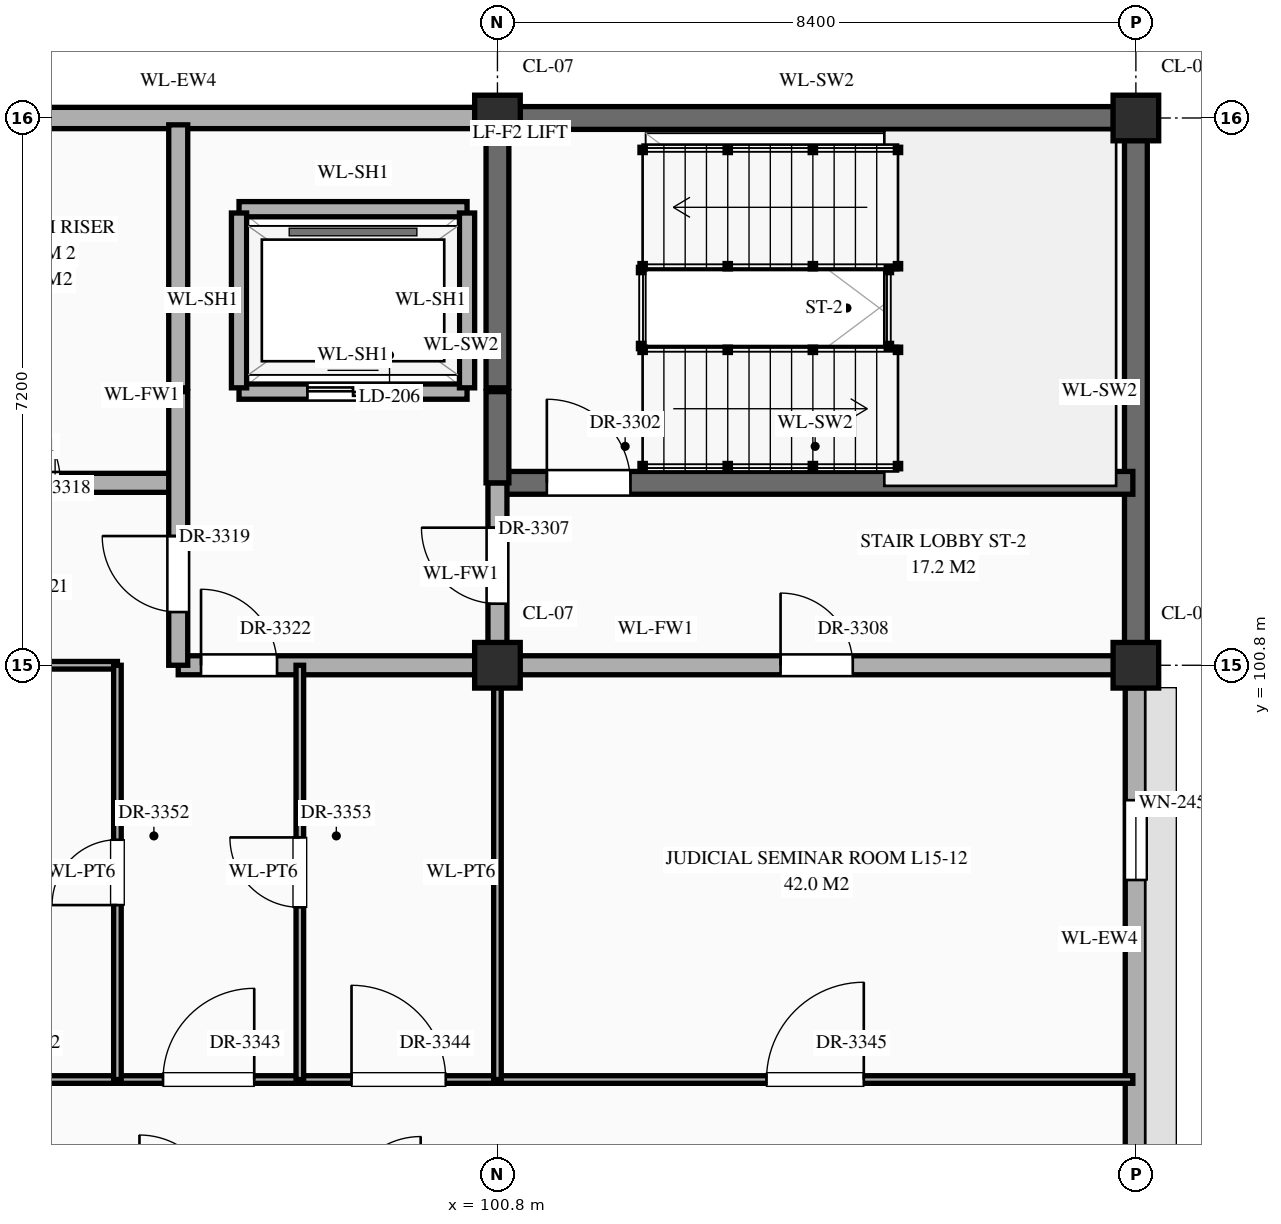
"""IFC4 building model, lengths in metres.
Left out: names, types, materials, properties, quantities, classifications, styles, units other than length and angle.
Written with IfcOpenShell. Run it as: python <this file> out.ifc"""

import sys

from ifc_helpers import new_model, si_unit, direction, frame, frame_2d, origin, origin_2d, place, context, subcontext, project, spatial, rectangle, extrude, element, fill, save


model = new_model("IFC4")
c1 = context("Model", 3, precision=1e-05, world=origin(), true_north=direction((0.0, 1.0)))
c2 = subcontext(c1, "Body", "Model", "MODEL_VIEW")
j1 = project(units=[si_unit("LENGTHUNIT", "METRE"), si_unit("PLANEANGLEUNIT", "RADIAN")], contexts=[c1])
p1 = place(None, origin())
s1 = spatial("IfcSite", under=j1, at=p1, CompositionType="ELEMENT")
p2 = place(p1, origin())
s2 = spatial("IfcBuilding", under=s1, at=p2, CompositionType="ELEMENT")
p3 = place(p2, frame((0.0, 0.0, 64.5)))
s3 = spatial("IfcBuildingStorey", under=s2, at=p3, CompositionType="ELEMENT", Elevation=64.5)
for number, where, z_axis, x_axis in (
    (1, (100.8, 100.8, 0.0), (0.0, 0.0, 1.0), (1.0, 0.0, 0.0)),
    (2, (100.8, 108.0, 0.0), (0.0, 0.0, 1.0), (1.0, 0.0, 0.0)),
    (3, (109.2, 100.8, 0.0), (0.0, 0.0, 1.0), (1.0, 0.0, 0.0)),
    (4, (109.2, 108.0, 0.0), (0.0, 0.0, 1.0), (1.0, 0.0, 0.0)),
):
    element("IfcColumn", number, at=place(p3, frame(where, z_axis=z_axis, x_axis=x_axis)), inside=s3, PredefinedType="COLUMN", context=c2, shape_type="SweptSolid", body=[
        extrude(rectangle(XDim=0.6, YDim=0.6, at=origin_2d()), origin(), (0.0, 0.0, 1.0), 4.2),
    ])
p4 = place(p3, frame((92.695, 108.0, 0.0), z_axis=(0.0, 0.0, 1.0), x_axis=(1.0, 0.0, 0.0)))
e5 = element("IfcWall", 5, at=p4, inside=s3, PredefinedType="STANDARD", context=c2, shape_type="SweptSolid", body=[
    extrude(rectangle(XDim=7.81, YDim=0.28, at=frame_2d((3.905, 0.0))), origin(), (0.0, 0.0, 1.0), 3.3),
])
p5 = place(p3, frame((109.2, 93.895, 0.0), z_axis=(0.0, 0.0, 1.0), x_axis=(0.0, 1.0, 0.0)))
e6 = element("IfcWall", 6, at=p5, inside=s3, PredefinedType="STANDARD", context=c2, shape_type="SweptSolid", body=[
    extrude(rectangle(XDim=6.61, YDim=0.28, at=frame_2d((3.305, 0.0))), origin(), (0.0, 0.0, 1.0), 3.3),
])
p6 = place(p5, frame((4.08, 0.0, 0.85)))
e7 = element("IfcOpeningElement", 7, at=p6, cuts=e6, PredefinedType="OPENING", context=c2, shape_type="SweptSolid", body=[
    extrude(rectangle(XDim=1.05, YDim=2.12, at=frame_2d((0.525, 1.06))), frame((0.0, 0.152, 0.0), z_axis=(0.0, -1.0, 0.0), x_axis=(1.0, 0.0, 0.0)), (0.0, 0.0, 1.0), 0.304),
])
p7 = place(p3, frame((101.095, 108.0, 0.0), z_axis=(0.0, 0.0, 1.0), x_axis=(1.0, 0.0, 0.0)))
e8 = element("IfcWall", 8, at=p7, inside=s3, PredefinedType="SHEAR", context=c2, shape_type="SweptSolid", body=[
    extrude(rectangle(XDim=7.81, YDim=0.3, at=frame_2d((3.905, 0.0))), origin(), (0.0, 0.0, 1.0), 3.95),
])
p8 = place(p3, frame((109.2, 101.095, 0.0), z_axis=(0.0, 0.0, 1.0), x_axis=(0.0, 1.0, 0.0)))
e9 = element("IfcWall", 9, at=p8, inside=s3, PredefinedType="SHEAR", context=c2, shape_type="SweptSolid", body=[
    extrude(rectangle(XDim=6.61, YDim=0.3, at=frame_2d((3.305, 0.0))), origin(), (0.0, 0.0, 1.0), 3.95),
])
p9 = place(p3, frame((58.84, 95.35, 0.0), z_axis=(0.0, 0.0, 1.0), x_axis=(1.0, 0.0, 0.0)))
e10 = element("IfcWall", 10, at=p9, inside=s3, PredefinedType="STANDARD", context=c2, shape_type="SweptSolid", body=[
    extrude(rectangle(XDim=50.32, YDim=0.1, at=frame_2d((25.16, 0.0))), origin(), (0.0, 0.0, 1.0), 3.95),
])
p10 = place(p9, frame((3.61, 0.0, 0.0)))
e11 = element("IfcOpeningElement", 11, at=p10, cuts=e10, PredefinedType="OPENING", context=c2, shape_type="SweptSolid", body=[
    extrude(rectangle(XDim=1.14, YDim=2.4, at=frame_2d((0.57, 1.2))), frame((0.0, 0.062, 0.0), z_axis=(0.0, -1.0, 0.0), x_axis=(1.0, 0.0, 0.0)), (0.0, 0.0, 1.0), 0.124),
])
p11 = place(p9, frame((9.61, 0.0, 0.0)))
e12 = element("IfcOpeningElement", 12, at=p11, cuts=e10, PredefinedType="OPENING", context=c2, shape_type="SweptSolid", body=[
    extrude(rectangle(XDim=0.9, YDim=2.15, at=frame_2d((0.45, 1.075))), frame((0.0, 0.062, 0.0), z_axis=(0.0, -1.0, 0.0), x_axis=(1.0, 0.0, 0.0)), (0.0, 0.0, 1.0), 0.124),
])
p12 = place(p9, frame((12.53, 0.0, 0.0)))
e13 = element("IfcOpeningElement", 13, at=p12, cuts=e10, PredefinedType="OPENING", context=c2, shape_type="SweptSolid", body=[
    extrude(rectangle(XDim=0.86, YDim=2.1, at=frame_2d((0.43, 1.05))), frame((0.0, 0.062, 0.0), z_axis=(0.0, -1.0, 0.0), x_axis=(1.0, 0.0, 0.0)), (0.0, 0.0, 1.0), 0.124),
])
p13 = place(p9, frame((15.0, 0.0, 0.0)))
e14 = element("IfcOpeningElement", 14, at=p13, cuts=e10, PredefinedType="OPENING", context=c2, shape_type="SweptSolid", body=[
    extrude(rectangle(XDim=0.92, YDim=2.15, at=frame_2d((0.46, 1.075))), frame((0.0, 0.062, 0.0), z_axis=(0.0, -1.0, 0.0), x_axis=(1.0, 0.0, 0.0)), (0.0, 0.0, 1.0), 0.124),
])
p14 = place(p9, frame((20.48, 0.0, 0.0)))
e15 = element("IfcOpeningElement", 15, at=p14, cuts=e10, PredefinedType="OPENING", context=c2, shape_type="SweptSolid", body=[
    extrude(rectangle(XDim=0.96, YDim=2.2, at=frame_2d((0.48, 1.1))), frame((0.0, 0.062, 0.0), z_axis=(0.0, -1.0, 0.0), x_axis=(1.0, 0.0, 0.0)), (0.0, 0.0, 1.0), 0.124),
])
p15 = place(p9, frame((28.8, 0.0, 0.0)))
e16 = element("IfcOpeningElement", 16, at=p15, cuts=e10, PredefinedType="OPENING", context=c2, shape_type="SweptSolid", body=[
    extrude(rectangle(XDim=1.12, YDim=2.25, at=frame_2d((0.56, 1.125))), frame((0.0, 0.062, 0.0), z_axis=(0.0, -1.0, 0.0), x_axis=(1.0, 0.0, 0.0)), (0.0, 0.0, 1.0), 0.124),
])
p16 = place(p9, frame((34.68, 0.0, 0.0)))
e17 = element("IfcOpeningElement", 17, at=p16, cuts=e10, PredefinedType="OPENING", context=c2, shape_type="SweptSolid", body=[
    extrude(rectangle(XDim=1.16, YDim=2.3, at=frame_2d((0.58, 1.15))), frame((0.0, 0.062, 0.0), z_axis=(0.0, -1.0, 0.0), x_axis=(1.0, 0.0, 0.0)), (0.0, 0.0, 1.0), 0.124),
])
p17 = place(p9, frame((37.56, 0.0, 0.0)))
e18 = element("IfcOpeningElement", 18, at=p17, cuts=e10, PredefinedType="OPENING", context=c2, shape_type="SweptSolid", body=[
    extrude(rectangle(XDim=1.2, YDim=2.35, at=frame_2d((0.6, 1.175))), frame((0.0, 0.062, 0.0), z_axis=(0.0, -1.0, 0.0), x_axis=(1.0, 0.0, 0.0)), (0.0, 0.0, 1.0), 0.124),
])
p18 = place(p9, frame((40.04, 0.0, 0.0)))
e19 = element("IfcOpeningElement", 19, at=p18, cuts=e10, PredefinedType="OPENING", context=c2, shape_type="SweptSolid", body=[
    extrude(rectangle(XDim=1.24, YDim=2.3, at=frame_2d((0.62, 1.15))), frame((0.0, 0.062, 0.0), z_axis=(0.0, -1.0, 0.0), x_axis=(1.0, 0.0, 0.0)), (0.0, 0.0, 1.0), 0.124),
])
p19 = place(p9, frame((45.5, 0.0, 0.0)))
e20 = element("IfcOpeningElement", 20, at=p19, cuts=e10, PredefinedType="OPENING", context=c2, shape_type="SweptSolid", body=[
    extrude(rectangle(XDim=1.28, YDim=2.35, at=frame_2d((0.64, 1.175))), frame((0.0, 0.062, 0.0), z_axis=(0.0, -1.0, 0.0), x_axis=(1.0, 0.0, 0.0)), (0.0, 0.0, 1.0), 0.124),
])
p20 = place(p3, frame((92.4, 100.8, 0.0), z_axis=(0.0, 0.0, 1.0), x_axis=(1.0, 0.0, 0.0)))
e21 = element("IfcWall", 21, at=p20, inside=s3, PredefinedType="STANDARD", context=c2, shape_type="SweptSolid", body=[
    extrude(rectangle(XDim=3.4, YDim=0.1, at=frame_2d((1.7, 0.0))), origin(), (0.0, 0.0, 1.0), 3.1),
])
p21 = place(p20, frame((1.31, 0.0, 0.0)))
e22 = element("IfcOpeningElement", 22, at=p21, cuts=e21, PredefinedType="OPENING", context=c2, shape_type="SweptSolid", body=[
    extrude(rectangle(XDim=1.0, YDim=2.25, at=frame_2d((0.5, 1.125))), frame((0.0, 0.062, 0.0), z_axis=(0.0, -1.0, 0.0), x_axis=(1.0, 0.0, 0.0)), (0.0, 0.0, 1.0), 0.124),
])
p22 = place(p3, frame((96.6, 100.8, 0.0), z_axis=(0.0, 0.0, 1.0), x_axis=(1.0, 0.0, 0.0)))
e23 = element("IfcWall", 23, at=p22, inside=s3, PredefinedType="STANDARD", context=c2, shape_type="SweptSolid", body=[
    extrude(rectangle(XDim=12.56, YDim=0.25, at=frame_2d((6.28, 0.0))), origin(), (0.0, 0.0, 1.0), 3.1),
])
p23 = place(p22, frame((7.925, 0.0, 0.0)))
e24 = element("IfcOpeningElement", 24, at=p23, cuts=e23, PredefinedType="OPENING", context=c2, shape_type="SweptSolid", body=[
    extrude(rectangle(XDim=0.95, YDim=2.15, at=frame_2d((0.475, 1.075))), frame((0.0, 0.137, 0.0), z_axis=(0.0, -1.0, 0.0), x_axis=(1.0, 0.0, 0.0)), (0.0, 0.0, 1.0), 0.274),
])
p24 = place(p22, frame((0.3, 0.0, 0.0)))
e25 = element("IfcOpeningElement", 25, at=p24, cuts=e23, PredefinedType="OPENING", context=c2, shape_type="SweptSolid", body=[
    extrude(rectangle(XDim=1.0, YDim=2.2, at=frame_2d((0.5, 1.1))), frame((0.0, 0.137, 0.0), z_axis=(0.0, -1.0, 0.0), x_axis=(1.0, 0.0, 0.0)), (0.0, 0.0, 1.0), 0.274),
])
p25 = place(p3, frame((92.4, 103.2, 0.0), z_axis=(0.0, 0.0, 1.0), x_axis=(1.0, 0.0, 0.0)))
e26 = element("IfcWall", 26, at=p25, inside=s3, PredefinedType="STANDARD", context=c2, shape_type="SweptSolid", body=[
    extrude(rectangle(XDim=4.2, YDim=0.25, at=frame_2d((2.1, 0.0))), origin(), (0.0, 0.0, 1.0), 3.95),
])
p26 = place(p25, frame((1.55, 0.0, 0.0)))
e27 = element("IfcOpeningElement", 27, at=p26, cuts=e26, PredefinedType="OPENING", context=c2, shape_type="SweptSolid", body=[
    extrude(rectangle(XDim=1.1, YDim=2.2, at=frame_2d((0.55, 1.1))), frame((0.0, 0.137, 0.0), z_axis=(0.0, -1.0, 0.0), x_axis=(1.0, 0.0, 0.0)), (0.0, 0.0, 1.0), 0.274),
])
p27 = place(p3, frame((100.8, 103.2, 0.0), z_axis=(0.0, 0.0, 1.0), x_axis=(1.0, 0.0, 0.0)))
e28 = element("IfcWall", 28, at=p27, inside=s3, PredefinedType="SHEAR", context=c2, shape_type="SweptSolid", body=[
    extrude(rectangle(XDim=8.36, YDim=0.3, at=frame_2d((4.18, 0.0))), origin(), (0.0, 0.0, 1.0), 3.95),
])
p28 = place(p27, frame((0.65, 0.0, 0.0)))
e29 = element("IfcOpeningElement", 29, at=p28, cuts=e28, PredefinedType="OPENING", context=c2, shape_type="SweptSolid", body=[
    extrude(rectangle(XDim=1.1, YDim=2.2, at=frame_2d((0.55, 1.1))), frame((0.0, 0.162, 0.0), z_axis=(0.0, -1.0, 0.0), x_axis=(1.0, 0.0, 0.0)), (0.0, 0.0, 1.0), 0.324),
])
p29 = place(p3, frame((97.4, 104.4, 0.0), z_axis=(0.0, 0.0, 1.0), x_axis=(1.0, 0.0, 0.0)))
e30 = element("IfcWall", 30, at=p29, inside=s3, PredefinedType="STANDARD", context=c2, shape_type="SweptSolid", body=[
    extrude(rectangle(XDim=3.0, YDim=0.2, at=frame_2d((1.5, 0.0))), origin(), (0.0, 0.0, 1.0), 3.95),
])
p30 = place(p29, frame((0.9, 0.0, 0.0)))
e31 = element("IfcOpeningElement", 31, at=p30, cuts=e30, PredefinedType="OPENING", context=c2, shape_type="SweptSolid", body=[
    extrude(rectangle(XDim=1.2, YDim=2.15, at=frame_2d((0.6, 1.075))), frame((0.0, 0.112, 0.0), z_axis=(0.0, -1.0, 0.0), x_axis=(1.0, 0.0, 0.0)), (0.0, 0.0, 1.0), 0.224),
])
p31 = place(p3, frame((97.4, 106.8, 0.0), z_axis=(0.0, 0.0, 1.0), x_axis=(1.0, 0.0, 0.0)))
e32 = element("IfcWall", 32, at=p31, inside=s3, PredefinedType="STANDARD", context=c2, shape_type="SweptSolid", body=[
    extrude(rectangle(XDim=3.0, YDim=0.2, at=frame_2d((1.5, 0.0))), origin(), (0.0, 0.0, 1.0), 3.95),
])
p32 = place(p3, frame((95.8, 95.35, 0.0), z_axis=(0.0, 0.0, 1.0), x_axis=(0.0, 1.0, 0.0)))
e33 = element("IfcWall", 33, at=p32, inside=s3, PredefinedType="STANDARD", context=c2, shape_type="SweptSolid", body=[
    extrude(rectangle(XDim=5.45, YDim=0.1, at=frame_2d((2.725, 0.0))), origin(), (0.0, 0.0, 1.0), 3.95),
])
p33 = place(p32, frame((2.295, 0.0, 0.0)))
e34 = element("IfcOpeningElement", 34, at=p33, cuts=e33, PredefinedType="OPENING", context=c2, shape_type="SweptSolid", body=[
    extrude(rectangle(XDim=0.86, YDim=2.1, at=frame_2d((0.43, 1.05))), frame((0.0, 0.062, 0.0), z_axis=(0.0, -1.0, 0.0), x_axis=(1.0, 0.0, 0.0)), (0.0, 0.0, 1.0), 0.124),
])
p34 = place(p3, frame((96.6, 100.8, 0.0), z_axis=(0.0, 0.0, 1.0), x_axis=(0.0, 1.0, 0.0)))
e35 = element("IfcWall", 35, at=p34, inside=s3, PredefinedType="STANDARD", context=c2, shape_type="SweptSolid", body=[
    extrude(rectangle(XDim=3.6, YDim=0.25, at=frame_2d((1.8, 0.0))), origin(), (0.0, 0.0, 1.0), 3.95),
])
p35 = place(p34, frame((0.7, 0.0, 0.0)))
e36 = element("IfcOpeningElement", 36, at=p35, cuts=e35, PredefinedType="OPENING", context=c2, shape_type="SweptSolid", body=[
    extrude(rectangle(XDim=1.0, YDim=2.2, at=frame_2d((0.5, 1.1))), frame((0.0, 0.137, 0.0), z_axis=(0.0, -1.0, 0.0), x_axis=(1.0, 0.0, 0.0)), (0.0, 0.0, 1.0), 0.274),
])
p36 = place(p3, frame((96.6, 104.45, 0.0), z_axis=(0.0, 0.0, 1.0), x_axis=(0.0, 1.0, 0.0)))
e37 = element("IfcWall", 37, at=p36, inside=s3, PredefinedType="STANDARD", context=c2, shape_type="SweptSolid", body=[
    extrude(rectangle(XDim=3.46, YDim=0.25, at=frame_2d((1.73, 0.0))), origin(), (0.0, 0.0, 1.0), 3.95),
])
p37 = place(p3, frame((97.4, 104.45, 0.0), z_axis=(0.0, 0.0, 1.0), x_axis=(0.0, 1.0, 0.0)))
e38 = element("IfcWall", 38, at=p37, inside=s3, PredefinedType="STANDARD", context=c2, shape_type="SweptSolid", body=[
    extrude(rectangle(XDim=2.3, YDim=0.2, at=frame_2d((1.15, 0.0))), origin(), (0.0, 0.0, 1.0), 3.95),
])
p38 = place(p3, frame((98.2, 95.35, 0.0), z_axis=(0.0, 0.0, 1.0), x_axis=(0.0, 1.0, 0.0)))
e39 = element("IfcWall", 39, at=p38, inside=s3, PredefinedType="STANDARD", context=c2, shape_type="SweptSolid", body=[
    extrude(rectangle(XDim=5.45, YDim=0.1, at=frame_2d((2.725, 0.0))), origin(), (0.0, 0.0, 1.0), 3.95),
])
p39 = place(p38, frame((2.265, 0.0, 0.0)))
e40 = element("IfcOpeningElement", 40, at=p39, cuts=e39, PredefinedType="OPENING", context=c2, shape_type="SweptSolid", body=[
    extrude(rectangle(XDim=0.92, YDim=2.15, at=frame_2d((0.46, 1.075))), frame((0.0, 0.062, 0.0), z_axis=(0.0, -1.0, 0.0), x_axis=(1.0, 0.0, 0.0)), (0.0, 0.0, 1.0), 0.124),
])
p40 = place(p3, frame((100.4, 104.45, 0.0), z_axis=(0.0, 0.0, 1.0), x_axis=(0.0, 1.0, 0.0)))
e41 = element("IfcWall", 41, at=p40, inside=s3, PredefinedType="STANDARD", context=c2, shape_type="SweptSolid", body=[
    extrude(rectangle(XDim=2.3, YDim=0.2, at=frame_2d((1.15, 0.0))), origin(), (0.0, 0.0, 1.0), 3.95),
])
p41 = place(p3, frame((100.8, 95.35, 0.0), z_axis=(0.0, 0.0, 1.0), x_axis=(0.0, 1.0, 0.0)))
e42 = element("IfcWall", 42, at=p41, inside=s3, PredefinedType="STANDARD", context=c2, shape_type="SweptSolid", body=[
    extrude(rectangle(XDim=5.45, YDim=0.1, at=frame_2d((2.725, 0.0))), origin(), (0.0, 0.0, 1.0), 3.2),
])
p42 = place(p3, frame((100.8, 100.8, 0.0), z_axis=(0.0, 0.0, 1.0), x_axis=(0.0, 1.0, 0.0)))
e43 = element("IfcWall", 43, at=p42, inside=s3, PredefinedType="STANDARD", context=c2, shape_type="SweptSolid", body=[
    extrude(rectangle(XDim=2.4, YDim=0.25, at=frame_2d((1.2, 0.0))), origin(), (0.0, 0.0, 1.0), 3.2),
])
p43 = place(p42, frame((0.81, 0.0, 0.0)))
e44 = element("IfcOpeningElement", 44, at=p43, cuts=e43, PredefinedType="OPENING", context=c2, shape_type="SweptSolid", body=[
    extrude(rectangle(XDim=1.0, YDim=2.2, at=frame_2d((0.5, 1.1))), frame((0.0, 0.137, 0.0), z_axis=(0.0, -1.0, 0.0), x_axis=(1.0, 0.0, 0.0)), (0.0, 0.0, 1.0), 0.274),
])
p44 = place(p3, frame((100.8, 103.2, 0.0), z_axis=(0.0, 0.0, 1.0), x_axis=(0.0, 1.0, 0.0)))
e45 = element("IfcWall", 45, at=p44, inside=s3, PredefinedType="SHEAR", context=c2, shape_type="SweptSolid", body=[
    extrude(rectangle(XDim=1.2, YDim=0.3, at=frame_2d((0.6, 0.0))), origin(), (0.0, 0.0, 1.0), 3.95),
])
p45 = place(p3, frame((100.8, 104.45, 0.0), z_axis=(0.0, 0.0, 1.0), x_axis=(0.0, 1.0, 0.0)))
e46 = element("IfcWall", 46, at=p45, inside=s3, PredefinedType="SHEAR", context=c2, shape_type="SweptSolid", body=[
    extrude(rectangle(XDim=3.46, YDim=0.3, at=frame_2d((1.73, 0.0))), origin(), (0.0, 0.0, 1.0), 3.95),
])
p46 = place(p6, origin())
e47 = element("IfcWindow", 47, at=p46, inside=s3, PartitioningType="SINGLE_PANEL", PredefinedType="WINDOW", context=c2, shape_type="SweptSolid", body=[
    extrude(rectangle(XDim=1.05, YDim=2.12, at=frame_2d((0.525, 1.06))), frame((0.0, 0.03, 0.0), z_axis=(0.0, -1.0, 0.0), x_axis=(1.0, 0.0, 0.0)), (0.0, 0.0, 1.0), 0.06),
])
fill(e7, e47)
p47 = place(p30, origin())
e48 = element("IfcDoor", 48, at=p47, inside=s3, OperationType="DOUBLE_DOOR_SLIDING", PredefinedType="DOOR", context=c2, shape_type="SweptSolid", body=[
    extrude(rectangle(XDim=1.2, YDim=2.15, at=frame_2d((0.6, 1.075))), frame((0.0, 0.025, 0.0), z_axis=(0.0, -1.0, 0.0), x_axis=(1.0, 0.0, 0.0)), (0.0, 0.0, 1.0), 0.05),
])
fill(e31, e48)
p48 = place(p28, origin())
e49 = element("IfcDoor", 49, at=p48, inside=s3, OperationType="SINGLE_SWING_LEFT", PredefinedType="DOOR", context=c2, shape_type="SweptSolid", body=[
    extrude(rectangle(XDim=1.1, YDim=2.2, at=frame_2d((0.55, 1.1))), frame((0.0, 0.025, 0.0), z_axis=(0.0, -1.0, 0.0), x_axis=(1.0, 0.0, 0.0)), (0.0, 0.0, 1.0), 0.05),
])
fill(e29, e49)
p49 = place(p43, origin())
e50 = element("IfcDoor", 50, at=p49, inside=s3, OperationType="SINGLE_SWING_RIGHT", PredefinedType="DOOR", context=c2, shape_type="SweptSolid", body=[
    extrude(rectangle(XDim=1.0, YDim=2.2, at=frame_2d((0.5, 1.1))), frame((0.0, 0.025, 0.0), z_axis=(0.0, -1.0, 0.0), x_axis=(1.0, 0.0, 0.0)), (0.0, 0.0, 1.0), 0.05),
])
fill(e44, e50)
p50 = place(p23, origin())
e51 = element("IfcDoor", 51, at=p50, inside=s3, OperationType="SINGLE_SWING_LEFT", PredefinedType="DOOR", context=c2, shape_type="SweptSolid", body=[
    extrude(rectangle(XDim=0.95, YDim=2.15, at=frame_2d((0.475, 1.075))), frame((0.0, 0.025, 0.0), z_axis=(0.0, -1.0, 0.0), x_axis=(1.0, 0.0, 0.0)), (0.0, 0.0, 1.0), 0.05),
])
fill(e24, e51)
p51 = place(p26, origin())
e52 = element("IfcDoor", 52, at=p51, inside=s3, OperationType="SINGLE_SWING_LEFT", PredefinedType="DOOR", context=c2, shape_type="SweptSolid", body=[
    extrude(rectangle(XDim=1.1, YDim=2.2, at=frame_2d((0.55, 1.1))), frame((0.0, 0.025, 0.0), z_axis=(0.0, -1.0, 0.0), x_axis=(1.0, 0.0, 0.0)), (0.0, 0.0, 1.0), 0.05),
])
fill(e27, e52)
p52 = place(p35, origin())
e53 = element("IfcDoor", 53, at=p52, inside=s3, OperationType="SINGLE_SWING_RIGHT", PredefinedType="DOOR", context=c2, shape_type="SweptSolid", body=[
    extrude(rectangle(XDim=1.0, YDim=2.2, at=frame_2d((0.5, 1.1))), frame((0.0, 0.025, 0.0), z_axis=(0.0, -1.0, 0.0), x_axis=(1.0, 0.0, 0.0)), (0.0, 0.0, 1.0), 0.05),
])
fill(e36, e53)
p53 = place(p24, origin())
e54 = element("IfcDoor", 54, at=p53, inside=s3, OperationType="SINGLE_SWING_LEFT", PredefinedType="DOOR", context=c2, shape_type="SweptSolid", body=[
    extrude(rectangle(XDim=1.0, YDim=2.2, at=frame_2d((0.5, 1.1))), frame((0.0, 0.025, 0.0), z_axis=(0.0, -1.0, 0.0), x_axis=(1.0, 0.0, 0.0)), (0.0, 0.0, 1.0), 0.05),
])
fill(e25, e54)
p54 = place(p17, origin())
e55 = element("IfcDoor", 55, at=p54, inside=s3, OperationType="SINGLE_SWING_RIGHT", PredefinedType="DOOR", context=c2, shape_type="SweptSolid", body=[
    extrude(rectangle(XDim=1.2, YDim=2.35, at=frame_2d((0.6, 1.175))), frame((0.0, 0.025, 0.0), z_axis=(0.0, -1.0, 0.0), x_axis=(1.0, 0.0, 0.0)), (0.0, 0.0, 1.0), 0.05),
])
fill(e18, e55)
p55 = place(p18, origin())
e56 = element("IfcDoor", 56, at=p55, inside=s3, OperationType="SINGLE_SWING_LEFT", PredefinedType="DOOR", context=c2, shape_type="SweptSolid", body=[
    extrude(rectangle(XDim=1.24, YDim=2.3, at=frame_2d((0.62, 1.15))), frame((0.0, 0.025, 0.0), z_axis=(0.0, -1.0, 0.0), x_axis=(1.0, 0.0, 0.0)), (0.0, 0.0, 1.0), 0.05),
])
fill(e19, e56)
p56 = place(p19, origin())
e57 = element("IfcDoor", 57, at=p56, inside=s3, OperationType="SINGLE_SWING_RIGHT", PredefinedType="DOOR", context=c2, shape_type="SweptSolid", body=[
    extrude(rectangle(XDim=1.28, YDim=2.35, at=frame_2d((0.64, 1.175))), frame((0.0, 0.025, 0.0), z_axis=(0.0, -1.0, 0.0), x_axis=(1.0, 0.0, 0.0)), (0.0, 0.0, 1.0), 0.05),
])
fill(e20, e57)
p57 = place(p33, origin())
e58 = element("IfcDoor", 58, at=p57, inside=s3, OperationType="SINGLE_SWING_LEFT", PredefinedType="DOOR", context=c2, shape_type="SweptSolid", body=[
    extrude(rectangle(XDim=0.86, YDim=2.1, at=frame_2d((0.43, 1.05))), frame((0.0, 0.025, 0.0), z_axis=(0.0, -1.0, 0.0), x_axis=(1.0, 0.0, 0.0)), (0.0, 0.0, 1.0), 0.05),
])
fill(e34, e58)
p58 = place(p39, origin())
e59 = element("IfcDoor", 59, at=p58, inside=s3, OperationType="SINGLE_SWING_RIGHT", PredefinedType="DOOR", context=c2, shape_type="SweptSolid", body=[
    extrude(rectangle(XDim=0.92, YDim=2.15, at=frame_2d((0.46, 1.075))), frame((0.0, 0.025, 0.0), z_axis=(0.0, -1.0, 0.0), x_axis=(1.0, 0.0, 0.0)), (0.0, 0.0, 1.0), 0.05),
])
fill(e40, e59)
save(model, sys.argv[1])
